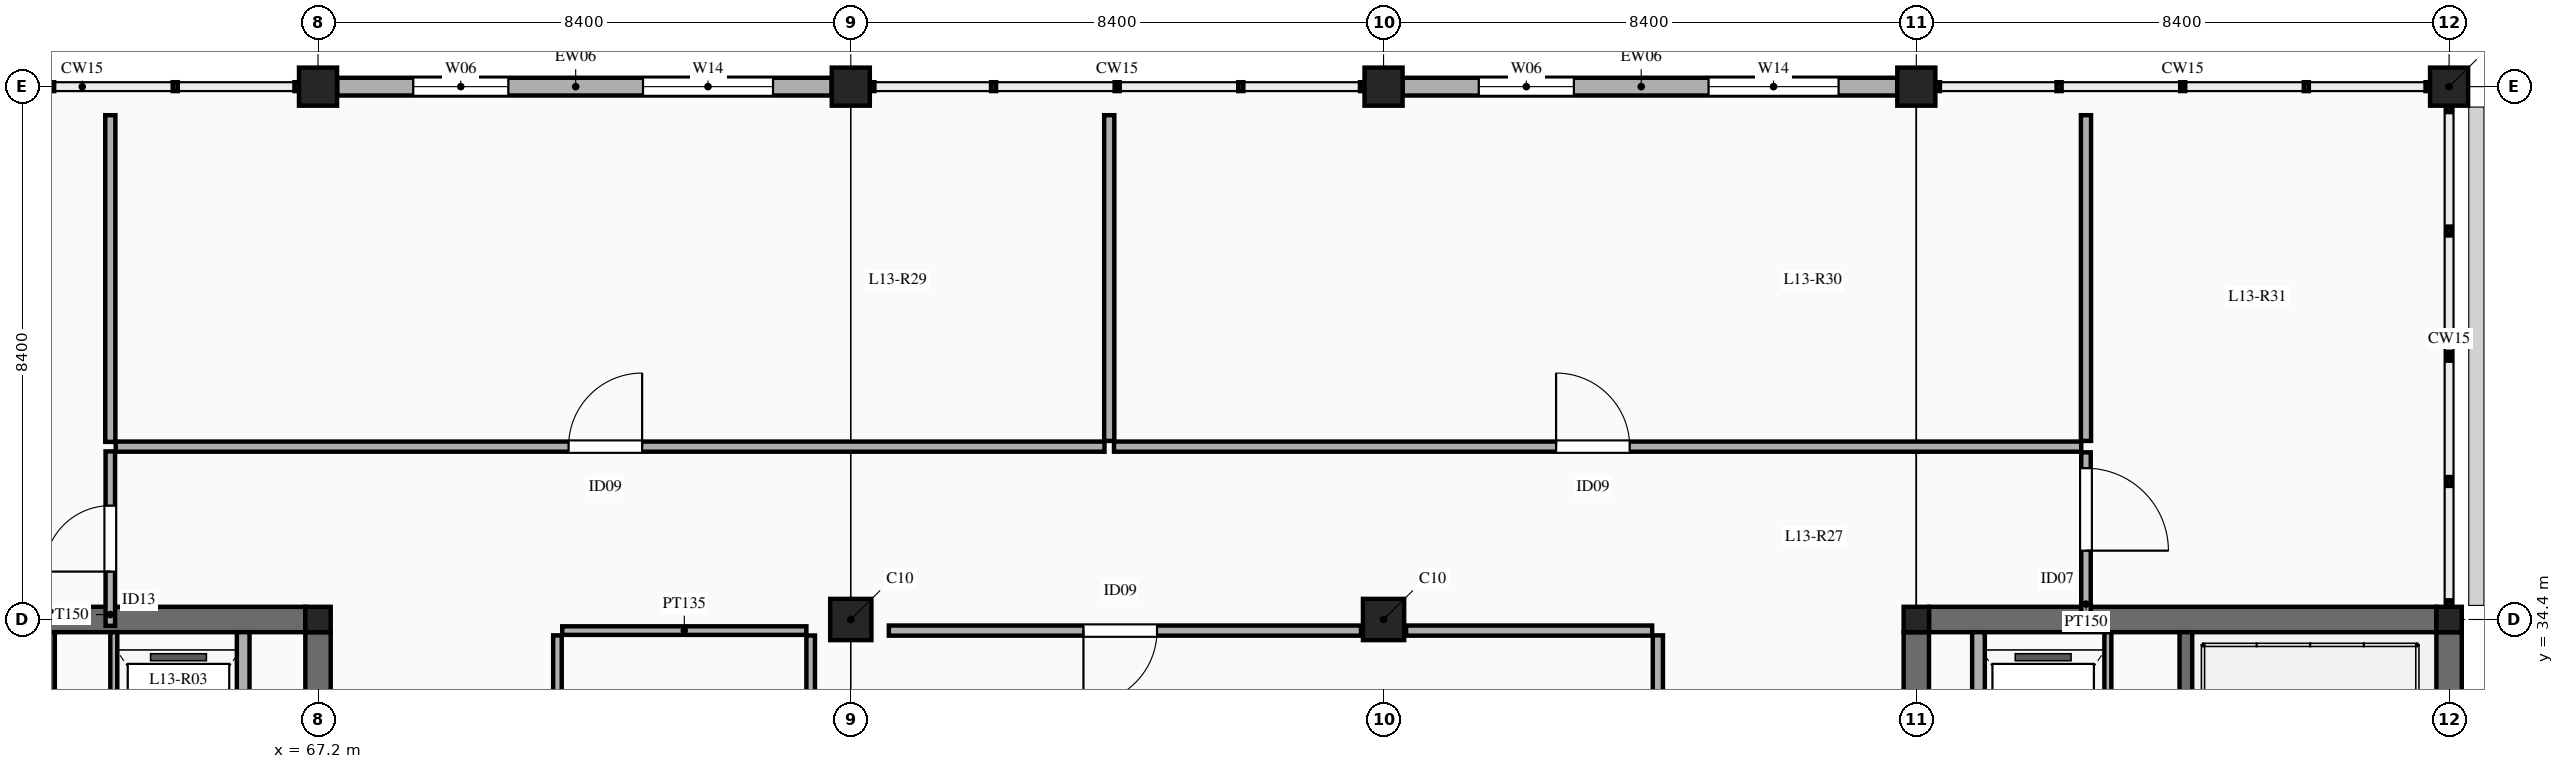
"""IFC4 building model, lengths in metres.
Left out: names, types, materials, properties, quantities, classifications, styles, units other than length and angle.
Written with IfcOpenShell. Run it as: python <this file> out.ifc"""

import sys

from ifc_helpers import new_model, si_unit, direction, frame, frame_2d, origin, origin_2d, place, context, subcontext, project, spatial, rectangle, extrude, element, fill, save


model = new_model("IFC4")
c1 = context("Model", 3, precision=1e-05, world=origin(), true_north=direction((0.0, 1.0)))
c2 = subcontext(c1, "Body", "Model", "MODEL_VIEW")
j1 = project(units=[si_unit("LENGTHUNIT", "METRE"), si_unit("PLANEANGLEUNIT", "RADIAN")], contexts=[c1])
p1 = place(None, origin())
s1 = spatial("IfcSite", under=j1, at=p1, CompositionType="ELEMENT")
p2 = place(p1, origin())
s2 = spatial("IfcBuilding", under=s1, at=p2, CompositionType="ELEMENT")
p3 = place(p2, frame((0.0, 0.0, 60.0)))
s3 = spatial("IfcBuildingStorey", under=s2, at=p3, CompositionType="ELEMENT", Elevation=60.0)
p4 = place(p3, frame((67.2, 34.4, 0.0), z_axis=(0.0, 0.0, 1.0), x_axis=(1.0, 0.0, 0.0)))
e1 = element("IfcColumn", 1, at=p4, inside=s3, PredefinedType="COLUMN", context=c2, shape_type="SweptSolid", body=[
    extrude(rectangle(XDim=0.4, YDim=0.4, at=origin_2d()), origin(), (0.0, 0.0, 1.0), 4.5),
])
p5 = place(p3, frame((67.2, 42.8, 0.0), z_axis=(0.0, 0.0, 1.0), x_axis=(1.0, 0.0, 0.0)))
e2 = element("IfcColumn", 2, at=p5, inside=s3, PredefinedType="COLUMN", context=c2, shape_type="SweptSolid", body=[
    extrude(rectangle(XDim=0.6, YDim=0.6, at=origin_2d()), origin(), (0.0, 0.0, 1.0), 4.5),
])
p6 = place(p3, frame((75.6, 34.4, 0.0), z_axis=(0.0, 0.0, 1.0), x_axis=(1.0, 0.0, 0.0)))
e3 = element("IfcColumn", 3, at=p6, inside=s3, PredefinedType="COLUMN", context=c2, shape_type="SweptSolid", body=[
    extrude(rectangle(XDim=0.65, YDim=0.65, at=origin_2d()), origin(), (0.0, 0.0, 1.0), 4.5),
])
p7 = place(p3, frame((75.6, 42.8, 0.0), z_axis=(0.0, 0.0, 1.0), x_axis=(1.0, 0.0, 0.0)))
e4 = element("IfcColumn", 4, at=p7, inside=s3, PredefinedType="COLUMN", context=c2, shape_type="SweptSolid", body=[
    extrude(rectangle(XDim=0.6, YDim=0.6, at=origin_2d()), origin(), (0.0, 0.0, 1.0), 4.5),
])
p8 = place(p3, frame((84.0, 34.4, 0.0), z_axis=(0.0, 0.0, 1.0), x_axis=(1.0, 0.0, 0.0)))
e5 = element("IfcColumn", 5, at=p8, inside=s3, PredefinedType="COLUMN", context=c2, shape_type="SweptSolid", body=[
    extrude(rectangle(XDim=0.65, YDim=0.65, at=origin_2d()), origin(), (0.0, 0.0, 1.0), 4.5),
])
p9 = place(p3, frame((84.0, 42.8, 0.0), z_axis=(0.0, 0.0, 1.0), x_axis=(1.0, 0.0, 0.0)))
e6 = element("IfcColumn", 6, at=p9, inside=s3, PredefinedType="COLUMN", context=c2, shape_type="SweptSolid", body=[
    extrude(rectangle(XDim=0.6, YDim=0.6, at=origin_2d()), origin(), (0.0, 0.0, 1.0), 4.5),
])
p10 = place(p3, frame((92.4, 34.4, 0.0), z_axis=(0.0, 0.0, 1.0), x_axis=(1.0, 0.0, 0.0)))
e7 = element("IfcColumn", 7, at=p10, inside=s3, PredefinedType="COLUMN", context=c2, shape_type="SweptSolid", body=[
    extrude(rectangle(XDim=0.4, YDim=0.4, at=origin_2d()), origin(), (0.0, 0.0, 1.0), 4.5),
])
p11 = place(p3, frame((92.4, 42.8, 0.0), z_axis=(0.0, 0.0, 1.0), x_axis=(1.0, 0.0, 0.0)))
e8 = element("IfcColumn", 8, at=p11, inside=s3, PredefinedType="COLUMN", context=c2, shape_type="SweptSolid", body=[
    extrude(rectangle(XDim=0.6, YDim=0.6, at=origin_2d()), origin(), (0.0, 0.0, 1.0), 4.5),
])
p12 = place(p3, frame((100.8, 34.4, 0.0), z_axis=(0.0, 0.0, 1.0), x_axis=(1.0, 0.0, 0.0)))
e9 = element("IfcColumn", 9, at=p12, inside=s3, PredefinedType="COLUMN", context=c2, shape_type="SweptSolid", body=[
    extrude(rectangle(XDim=0.4, YDim=0.4, at=origin_2d()), origin(), (0.0, 0.0, 1.0), 4.5),
])
p13 = place(p3, frame((100.8, 42.8, 0.0), z_axis=(0.0, 0.0, 1.0), x_axis=(1.0, 0.0, 0.0)))
e10 = element("IfcColumn", 10, at=p13, inside=s3, PredefinedType="COLUMN", context=c2, shape_type="SweptSolid", body=[
    extrude(rectangle(XDim=0.6, YDim=0.6, at=origin_2d()), origin(), (0.0, 0.0, 1.0), 4.5),
])
for number, where, z_axis, x_axis in (
    (11, (67.2, 26.2, 0.0), (0.0, 0.0, 1.0), (0.0, 1.0, 0.0)),
    (12, (59.0, 34.4, 0.0), (0.0, 0.0, 1.0), (1.0, 0.0, 0.0)),
    (13, (92.4, 26.2, 0.0), (0.0, 0.0, 1.0), (0.0, 1.0, 0.0)),
    (14, (100.8, 26.2, 0.0), (0.0, 0.0, 1.0), (0.0, 1.0, 0.0)),
    (15, (92.6, 34.4, 0.0), (0.0, 0.0, 1.0), (1.0, 0.0, 0.0)),
):
    element("IfcWall", number, at=place(p3, frame(where, z_axis=z_axis, x_axis=x_axis)), inside=s3, PredefinedType="SHEAR", context=c2, shape_type="SweptSolid", body=[
        extrude(rectangle(XDim=8.0, YDim=0.4, at=frame_2d((4.0, 0.0))), origin(), (0.0, 0.0, 1.0), 4.5),
    ])
p14 = place(p3, frame((67.502, 42.8, 0.0), z_axis=(0.0, 0.0, 1.0), x_axis=(1.0, 0.0, 0.0)))
e16 = element("IfcWall", 16, at=p14, inside=s3, PredefinedType="ELEMENTEDWALL", context=c2, shape_type="SweptSolid", body=[
    extrude(rectangle(XDim=7.796, YDim=0.28, at=frame_2d((3.898, 0.0))), origin(), (0.0, 0.0, 1.0), 3.55),
])
p15 = place(p14, frame((1.199, 0.0, 0.9)))
e17 = element("IfcOpeningElement", 17, at=p15, cuts=e16, PredefinedType="OPENING", context=c2, shape_type="SweptSolid", body=[
    extrude(rectangle(XDim=1.5, YDim=2.0, at=frame_2d((0.75, 1.0))), frame((0.0, 0.15, 0.0), z_axis=(0.0, -1.0, 0.0), x_axis=(1.0, 0.0, 0.0)), (0.0, 0.0, 1.0), 0.3),
])
p16 = place(p14, frame((4.822, 0.0, 0.9)))
e18 = element("IfcOpeningElement", 18, at=p16, cuts=e16, PredefinedType="OPENING", context=c2, shape_type="SweptSolid", body=[
    extrude(rectangle(XDim=2.05, YDim=2.1, at=frame_2d((1.025, 1.05))), frame((0.0, 0.15, 0.0), z_axis=(0.0, -1.0, 0.0), x_axis=(1.0, 0.0, 0.0)), (0.0, 0.0, 1.0), 0.3),
])
p17 = place(p3, frame((84.302, 42.8, 0.0), z_axis=(0.0, 0.0, 1.0), x_axis=(1.0, 0.0, 0.0)))
e19 = element("IfcWall", 19, at=p17, inside=s3, PredefinedType="ELEMENTEDWALL", context=c2, shape_type="SweptSolid", body=[
    extrude(rectangle(XDim=7.796, YDim=0.28, at=frame_2d((3.898, 0.0))), origin(), (0.0, 0.0, 1.0), 3.55),
])
p18 = place(p17, frame((1.199, 0.0, 0.9)))
e20 = element("IfcOpeningElement", 20, at=p18, cuts=e19, PredefinedType="OPENING", context=c2, shape_type="SweptSolid", body=[
    extrude(rectangle(XDim=1.5, YDim=2.0, at=frame_2d((0.75, 1.0))), frame((0.0, 0.15, 0.0), z_axis=(0.0, -1.0, 0.0), x_axis=(1.0, 0.0, 0.0)), (0.0, 0.0, 1.0), 0.3),
])
p19 = place(p17, frame((4.822, 0.0, 0.9)))
e21 = element("IfcOpeningElement", 21, at=p19, cuts=e19, PredefinedType="OPENING", context=c2, shape_type="SweptSolid", body=[
    extrude(rectangle(XDim=2.05, YDim=2.1, at=frame_2d((1.025, 1.05))), frame((0.0, 0.15, 0.0), z_axis=(0.0, -1.0, 0.0), x_axis=(1.0, 0.0, 0.0)), (0.0, 0.0, 1.0), 0.3),
])
p20 = place(p3, frame((62.95, 26.1, 0.0), z_axis=(0.0, 0.0, 1.0), x_axis=(0.0, 1.0, 0.0)))
e22 = element("IfcWall", 22, at=p20, inside=s3, PredefinedType="SOLIDWALL", context=c2, shape_type="SweptSolid", body=[
    extrude(rectangle(XDim=8.1, YDim=0.2, at=frame_2d((4.05, 0.0))), origin(), (0.0, 0.0, 1.0), 4.3),
])
p21 = place(p20, frame((0.45, 0.0, 0.0)))
e23 = element("IfcOpeningElement", 23, at=p21, cuts=e22, PredefinedType="OPENING", context=c2, shape_type="SweptSolid", body=[
    extrude(rectangle(XDim=1.12, YDim=2.15, at=frame_2d((0.56, 1.075))), frame((0.0, 0.11, 0.0), z_axis=(0.0, -1.0, 0.0), x_axis=(1.0, 0.0, 0.0)), (0.0, 0.0, 1.0), 0.22),
])
p22 = place(p3, frame((63.98, 31.15, 0.0), z_axis=(0.0, 0.0, 1.0), x_axis=(0.0, 1.0, 0.0)))
e24 = element("IfcWall", 24, at=p22, inside=s3, PredefinedType="PARTITIONING", context=c2, shape_type="SweptSolid", body=[
    extrude(rectangle(XDim=3.05, YDim=0.11, at=frame_2d((1.525, 0.0))), origin(), (0.0, 0.0, 1.0), 4.3),
])
p23 = place(p3, frame((66.02, 31.15, 0.0), z_axis=(0.0, 0.0, 1.0), x_axis=(0.0, 1.0, 0.0)))
e25 = element("IfcWall", 25, at=p23, inside=s3, PredefinedType="SOLIDWALL", context=c2, shape_type="SweptSolid", body=[
    extrude(rectangle(XDim=3.05, YDim=0.2, at=frame_2d((1.525, 0.0))), origin(), (0.0, 0.0, 1.0), 4.3),
])
p24 = place(p3, frame((96.65, 26.1, 0.0), z_axis=(0.0, 0.0, 1.0), x_axis=(0.0, 1.0, 0.0)))
e26 = element("IfcWall", 26, at=p24, inside=s3, PredefinedType="SOLIDWALL", context=c2, shape_type="SweptSolid", body=[
    extrude(rectangle(XDim=8.1, YDim=0.2, at=frame_2d((4.05, 0.0))), origin(), (0.0, 0.0, 1.0), 4.3),
])
p25 = place(p24, frame((0.45, 0.0, 0.0)))
e27 = element("IfcOpeningElement", 27, at=p25, cuts=e26, PredefinedType="OPENING", context=c2, shape_type="SweptSolid", body=[
    extrude(rectangle(XDim=1.12, YDim=2.15, at=frame_2d((0.56, 1.075))), frame((0.0, 0.11, 0.0), z_axis=(0.0, -1.0, 0.0), x_axis=(1.0, 0.0, 0.0)), (0.0, 0.0, 1.0), 0.22),
])
p26 = place(p3, frame((95.42, 31.15, 0.0), z_axis=(0.0, 0.0, 1.0), x_axis=(0.0, 1.0, 0.0)))
e28 = element("IfcWall", 28, at=p26, inside=s3, PredefinedType="PARTITIONING", context=c2, shape_type="SweptSolid", body=[
    extrude(rectangle(XDim=3.05, YDim=0.11, at=frame_2d((1.525, 0.0))), origin(), (0.0, 0.0, 1.0), 4.3),
])
p27 = place(p3, frame((93.38, 31.15, 0.0), z_axis=(0.0, 0.0, 1.0), x_axis=(0.0, 1.0, 0.0)))
e29 = element("IfcWall", 29, at=p27, inside=s3, PredefinedType="SOLIDWALL", context=c2, shape_type="SweptSolid", body=[
    extrude(rectangle(XDim=3.05, YDim=0.2, at=frame_2d((1.525, 0.0))), origin(), (0.0, 0.0, 1.0), 4.3),
])
p28 = place(p3, frame((70.975, 30.25, 0.0), z_axis=(0.0, 0.0, 1.0), x_axis=(0.0, 1.0, 0.0)))
e30 = element("IfcWall", 30, at=p28, inside=s3, PredefinedType="PARTITIONING", context=c2, shape_type="SweptSolid", body=[
    extrude(rectangle(XDim=3.9, YDim=0.135, at=frame_2d((1.95, 0.0))), origin(), (0.0, 0.0, 1.0), 3.45),
])
p29 = place(p28, frame((1.46, 0.0, 0.0)))
e31 = element("IfcOpeningElement", 31, at=p29, cuts=e30, PredefinedType="OPENING", context=c2, shape_type="SweptSolid", body=[
    extrude(rectangle(XDim=0.98, YDim=2.15, at=frame_2d((0.49, 1.075))), frame((0.0, 0.077, 0.0), z_axis=(0.0, -1.0, 0.0), x_axis=(1.0, 0.0, 0.0)), (0.0, 0.0, 1.0), 0.155),
])
p30 = place(p3, frame((71.05, 34.225, 0.0), z_axis=(0.0, 0.0, 1.0), x_axis=(1.0, 0.0, 0.0)))
e32 = element("IfcWall", 32, at=p30, inside=s3, PredefinedType="PARTITIONING", context=c2, shape_type="SweptSolid", body=[
    extrude(rectangle(XDim=3.85, YDim=0.135, at=frame_2d((1.925, 0.0))), origin(), (0.0, 0.0, 1.0), 3.45),
])
p31 = place(p3, frame((88.325, 29.45, 0.0), z_axis=(0.0, 0.0, 1.0), x_axis=(0.0, 1.0, 0.0)))
e33 = element("IfcWall", 33, at=p31, inside=s3, PredefinedType="PARTITIONING", context=c2, shape_type="SweptSolid", body=[
    extrude(rectangle(XDim=4.7, YDim=0.16, at=frame_2d((2.35, 0.0))), origin(), (0.0, 0.0, 1.0), 3.45),
])
p32 = place(p3, frame((76.2, 34.225, 0.0), z_axis=(0.0, 0.0, 1.0), x_axis=(1.0, 0.0, 0.0)))
e34 = element("IfcWall", 34, at=p32, inside=s3, PredefinedType="PARTITIONING", context=c2, shape_type="SweptSolid", body=[
    extrude(rectangle(XDim=7.445, YDim=0.16, at=frame_2d((3.723, 0.0))), origin(), (0.0, 0.0, 1.0), 3.45),
])
p33 = place(p32, frame((3.068, 0.0, 0.0)))
e35 = element("IfcOpeningElement", 35, at=p33, cuts=e34, PredefinedType="OPENING", context=c2, shape_type="SweptSolid", body=[
    extrude(rectangle(XDim=1.16, YDim=2.2, at=frame_2d((0.58, 1.1))), frame((0.0, 0.09, 0.0), z_axis=(0.0, -1.0, 0.0), x_axis=(1.0, 0.0, 0.0)), (0.0, 0.0, 1.0), 0.18),
])
p34 = place(p3, frame((84.355, 34.225, 0.0), z_axis=(0.0, 0.0, 1.0), x_axis=(1.0, 0.0, 0.0)))
e36 = element("IfcWall", 36, at=p34, inside=s3, PredefinedType="PARTITIONING", context=c2, shape_type="SweptSolid", body=[
    extrude(rectangle(XDim=3.88, YDim=0.16, at=frame_2d((1.94, 0.0))), origin(), (0.0, 0.0, 1.0), 3.45),
])
p35 = place(p3, frame((63.925, 34.3, 0.0), z_axis=(0.0, 0.0, 1.0), x_axis=(0.0, 1.0, 0.0)))
e37 = element("IfcWall", 37, at=p35, inside=s3, PredefinedType="PARTITIONING", context=c2, shape_type="SweptSolid", body=[
    extrude(rectangle(XDim=2.75, YDim=0.15, at=frame_2d((1.375, 0.0))), origin(), (0.0, 0.0, 1.0), 3.45),
])
p36 = place(p35, frame((0.855, 0.0, 0.0)))
e38 = element("IfcOpeningElement", 38, at=p36, cuts=e37, PredefinedType="OPENING", context=c2, shape_type="SweptSolid", body=[
    extrude(rectangle(XDim=1.04, YDim=2.15, at=frame_2d((0.52, 1.075))), frame((0.0, 0.085, 0.0), z_axis=(0.0, -1.0, 0.0), x_axis=(1.0, 0.0, 0.0)), (0.0, 0.0, 1.0), 0.17),
])
p37 = place(p3, frame((64.01, 37.125, 0.0), z_axis=(0.0, 0.0, 1.0), x_axis=(1.0, 0.0, 0.0)))
e39 = element("IfcWall", 39, at=p37, inside=s3, PredefinedType="PARTITIONING", context=c2, shape_type="SweptSolid", body=[
    extrude(rectangle(XDim=15.59, YDim=0.16, at=frame_2d((7.795, 0.0))), origin(), (0.0, 0.0, 1.0), 3.45),
])
p38 = place(p37, frame((7.14, 0.0, 0.0)))
e40 = element("IfcOpeningElement", 40, at=p38, cuts=e39, PredefinedType="OPENING", context=c2, shape_type="SweptSolid", body=[
    extrude(rectangle(XDim=1.16, YDim=2.2, at=frame_2d((0.58, 1.1))), frame((0.0, 0.09, 0.0), z_axis=(0.0, -1.0, 0.0), x_axis=(1.0, 0.0, 0.0)), (0.0, 0.0, 1.0), 0.18),
])
p39 = place(p3, frame((79.75, 37.125, 0.0), z_axis=(0.0, 0.0, 1.0), x_axis=(1.0, 0.0, 0.0)))
e41 = element("IfcWall", 41, at=p39, inside=s3, PredefinedType="PARTITIONING", context=c2, shape_type="SweptSolid", body=[
    extrude(rectangle(XDim=15.25, YDim=0.16, at=frame_2d((7.625, 0.0))), origin(), (0.0, 0.0, 1.0), 3.45),
])
p40 = place(p39, frame((6.97, 0.0, 0.0)))
e42 = element("IfcOpeningElement", 42, at=p40, cuts=e41, PredefinedType="OPENING", context=c2, shape_type="SweptSolid", body=[
    extrude(rectangle(XDim=1.16, YDim=2.2, at=frame_2d((0.58, 1.1))), frame((0.0, 0.09, 0.0), z_axis=(0.0, -1.0, 0.0), x_axis=(1.0, 0.0, 0.0)), (0.0, 0.0, 1.0), 0.18),
])
p41 = place(p3, frame((95.075, 34.3, 0.0), z_axis=(0.0, 0.0, 1.0), x_axis=(0.0, 1.0, 0.0)))
e43 = element("IfcWall", 43, at=p41, inside=s3, PredefinedType="PARTITIONING", context=c2, shape_type="SweptSolid", body=[
    extrude(rectangle(XDim=2.735, YDim=0.15, at=frame_2d((1.367, 0.0))), origin(), (0.0, 0.0, 1.0), 3.45),
])
p42 = place(p41, frame((1.185, 0.0, 0.0)))
e44 = element("IfcOpeningElement", 44, at=p42, cuts=e43, PredefinedType="OPENING", context=c2, shape_type="SweptSolid", body=[
    extrude(rectangle(XDim=1.3, YDim=2.25, at=frame_2d((0.65, 1.125))), frame((0.0, 0.085, 0.0), z_axis=(0.0, -1.0, 0.0), x_axis=(1.0, 0.0, 0.0)), (0.0, 0.0, 1.0), 0.17),
])
p43 = place(p3, frame((63.925, 37.2, 0.0), z_axis=(0.0, 0.0, 1.0), x_axis=(0.0, 1.0, 0.0)))
e45 = element("IfcWall", 45, at=p43, inside=s3, PredefinedType="PARTITIONING", context=c2, shape_type="SweptSolid", body=[
    extrude(rectangle(XDim=5.15, YDim=0.16, at=frame_2d((2.575, 0.0))), origin(), (0.0, 0.0, 1.0), 3.45),
])
for number, where, z_axis, x_axis in (
    (46, (79.675, 37.215, 0.0), (0.0, 0.0, 1.0), (0.0, 1.0, 0.0)),
    (47, (95.075, 37.215, 0.0), (0.0, 0.0, 1.0), (0.0, 1.0, 0.0)),
):
    element("IfcWall", number, at=place(p3, frame(where, z_axis=z_axis, x_axis=x_axis)), inside=s3, PredefinedType="PARTITIONING", context=c2, shape_type="SweptSolid", body=[
        extrude(rectangle(XDim=5.135, YDim=0.16, at=frame_2d((2.567, 0.0))), origin(), (0.0, 0.0, 1.0), 3.45),
    ])
p44 = place(p3, frame((74.968, 30.252, 0.0), z_axis=(0.0, 0.0, 1.0), x_axis=(0.0, 1.0, 0.0)))
e48 = element("IfcWall", 48, at=p44, inside=s3, PredefinedType="PARTITIONING", context=c2, shape_type="SweptSolid", body=[
    extrude(rectangle(XDim=3.895, YDim=0.135, at=frame_2d((1.948, 0.0))), origin(), (0.0, 0.0, 1.0), 3.45),
])
p45 = place(p15, origin())
e49 = element("IfcWindow", 49, at=p45, inside=s3, PartitioningType="DOUBLE_PANEL_VERTICAL", PredefinedType="WINDOW", context=c2, shape_type="SweptSolid", body=[
    extrude(rectangle(XDim=1.5, YDim=2.0, at=frame_2d((0.75, 1.0))), frame((0.0, 0.03, 0.0), z_axis=(0.0, -1.0, 0.0), x_axis=(1.0, 0.0, 0.0)), (0.0, 0.0, 1.0), 0.06),
])
fill(e17, e49)
p46 = place(p16, origin())
e50 = element("IfcWindow", 50, at=p46, inside=s3, PartitioningType="TRIPLE_PANEL_VERTICAL", PredefinedType="WINDOW", context=c2, shape_type="SweptSolid", body=[
    extrude(rectangle(XDim=2.05, YDim=2.1, at=frame_2d((1.025, 1.05))), frame((0.0, 0.03, 0.0), z_axis=(0.0, -1.0, 0.0), x_axis=(1.0, 0.0, 0.0)), (0.0, 0.0, 1.0), 0.06),
])
fill(e18, e50)
p47 = place(p18, origin())
e51 = element("IfcWindow", 51, at=p47, inside=s3, PartitioningType="DOUBLE_PANEL_VERTICAL", PredefinedType="WINDOW", context=c2, shape_type="SweptSolid", body=[
    extrude(rectangle(XDim=1.5, YDim=2.0, at=frame_2d((0.75, 1.0))), frame((0.0, 0.03, 0.0), z_axis=(0.0, -1.0, 0.0), x_axis=(1.0, 0.0, 0.0)), (0.0, 0.0, 1.0), 0.06),
])
fill(e20, e51)
p48 = place(p19, origin())
e52 = element("IfcWindow", 52, at=p48, inside=s3, PartitioningType="TRIPLE_PANEL_VERTICAL", PredefinedType="WINDOW", context=c2, shape_type="SweptSolid", body=[
    extrude(rectangle(XDim=2.05, YDim=2.1, at=frame_2d((1.025, 1.05))), frame((0.0, 0.03, 0.0), z_axis=(0.0, -1.0, 0.0), x_axis=(1.0, 0.0, 0.0)), (0.0, 0.0, 1.0), 0.06),
])
fill(e21, e52)
p49 = place(p33, frame((1.16, 0.0, 0.0), z_axis=(0.0, 0.0, 1.0), x_axis=(-1.0, 0.0, 0.0)))
e53 = element("IfcDoor", 53, at=p49, inside=s3, OperationType="SINGLE_SWING_RIGHT", PredefinedType="DOOR", context=c2, shape_type="SweptSolid", body=[
    extrude(rectangle(XDim=1.16, YDim=2.2, at=frame_2d((0.58, 1.1))), frame((0.0, 0.025, 0.0), z_axis=(0.0, -1.0, 0.0), x_axis=(1.0, 0.0, 0.0)), (0.0, 0.0, 1.0), 0.05),
])
fill(e35, e53)
p50 = place(p36, origin())
e54 = element("IfcDoor", 54, at=p50, inside=s3, OperationType="SINGLE_SWING_LEFT", PredefinedType="DOOR", context=c2, shape_type="SweptSolid", body=[
    extrude(rectangle(XDim=1.04, YDim=2.15, at=frame_2d((0.52, 1.075))), frame((0.0, 0.025, 0.0), z_axis=(0.0, -1.0, 0.0), x_axis=(1.0, 0.0, 0.0)), (0.0, 0.0, 1.0), 0.05),
])
fill(e38, e54)
p51 = place(p38, origin())
e55 = element("IfcDoor", 55, at=p51, inside=s3, OperationType="SINGLE_SWING_RIGHT", PredefinedType="DOOR", context=c2, shape_type="SweptSolid", body=[
    extrude(rectangle(XDim=1.16, YDim=2.2, at=frame_2d((0.58, 1.1))), frame((0.0, 0.025, 0.0), z_axis=(0.0, -1.0, 0.0), x_axis=(1.0, 0.0, 0.0)), (0.0, 0.0, 1.0), 0.05),
])
fill(e40, e55)
p52 = place(p40, origin())
e56 = element("IfcDoor", 56, at=p52, inside=s3, OperationType="SINGLE_SWING_LEFT", PredefinedType="DOOR", context=c2, shape_type="SweptSolid", body=[
    extrude(rectangle(XDim=1.16, YDim=2.2, at=frame_2d((0.58, 1.1))), frame((0.0, 0.025, 0.0), z_axis=(0.0, -1.0, 0.0), x_axis=(1.0, 0.0, 0.0)), (0.0, 0.0, 1.0), 0.05),
])
fill(e42, e56)
p53 = place(p42, frame((1.3, 0.0, 0.0), z_axis=(0.0, 0.0, 1.0), x_axis=(-1.0, 0.0, 0.0)))
e57 = element("IfcDoor", 57, at=p53, inside=s3, OperationType="SINGLE_SWING_RIGHT", PredefinedType="DOOR", context=c2, shape_type="SweptSolid", body=[
    extrude(rectangle(XDim=1.3, YDim=2.25, at=frame_2d((0.65, 1.125))), frame((0.0, 0.025, 0.0), z_axis=(0.0, -1.0, 0.0), x_axis=(1.0, 0.0, 0.0)), (0.0, 0.0, 1.0), 0.05),
])
fill(e44, e57)
save(model, sys.argv[1])
